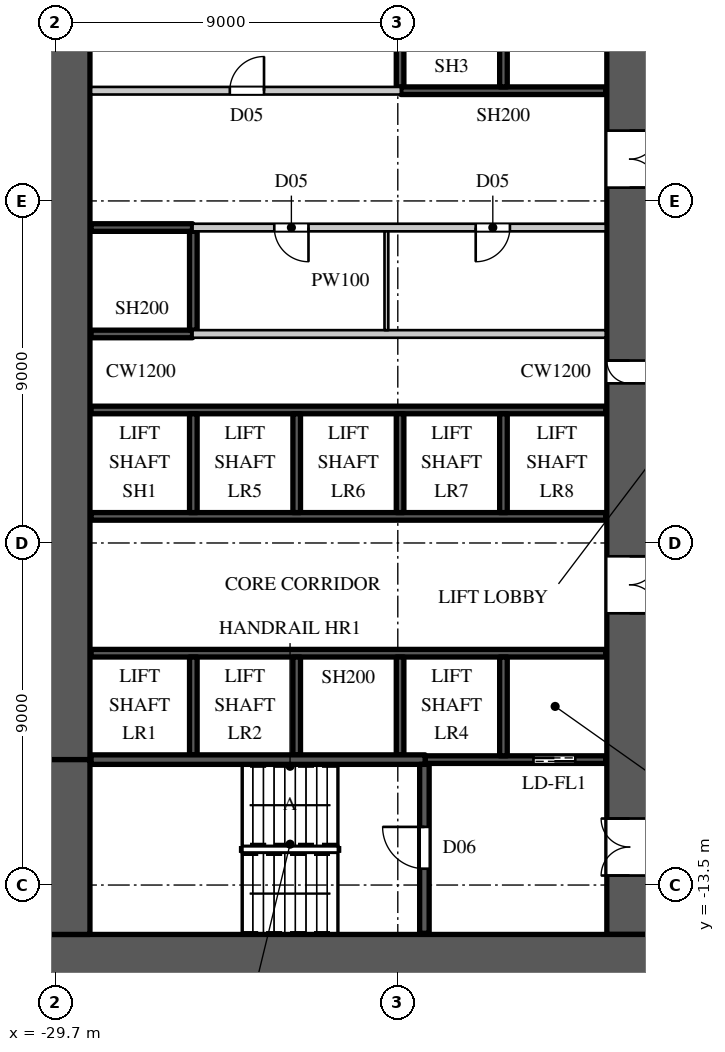
"""IFC4 building model, lengths in metres.
Left out: names, types, materials, properties, quantities, classifications, styles, units other than length and angle.
Written with IfcOpenShell. Run it as: python <this file> out.ifc"""

import sys

from ifc_helpers import new_model, si_unit, direction, frame, frame_2d, origin, place, context, subcontext, project, spatial, rectangle, extrude, element, fill, save


model = new_model("IFC4")
c1 = context("Model", 3, precision=1e-05, world=origin(), true_north=direction((0.0, 1.0)))
c2 = subcontext(c1, "Body", "Model", "MODEL_VIEW")
j1 = project(units=[si_unit("LENGTHUNIT", "METRE"), si_unit("PLANEANGLEUNIT", "RADIAN")], contexts=[c1])
p1 = place(None, origin())
s1 = spatial("IfcSite", under=j1, at=p1, CompositionType="ELEMENT")
p2 = place(p1, origin())
s2 = spatial("IfcBuilding", under=s1, at=p2, CompositionType="ELEMENT")
p3 = place(p2, frame((0.0, 0.0, 29.0)))
s3 = spatial("IfcBuildingStorey", under=s2, at=p3, CompositionType="ELEMENT", Elevation=29.0)
p4 = place(p3, frame((-30.0, -15.4, 0.0), z_axis=(0.0, 0.0, 1.0), x_axis=(1.0, 0.0, 0.0)))
e1 = element("IfcWall", 1, at=p4, inside=s3, PredefinedType="SHEAR", context=c2, shape_type="SweptSolid", body=[
    extrude(rectangle(XDim=16.0, YDim=1.2, at=frame_2d((8.0, 0.0))), origin(), (0.0, 0.0, 1.0), 7.0),
])
p5 = place(p3, frame((-14.6, -14.8, 0.0), z_axis=(0.0, 0.0, 1.0), x_axis=(0.0, 1.0, 0.0)))
e2 = element("IfcWall", 2, at=p5, inside=s3, PredefinedType="SHEAR", context=c2, shape_type="SweptSolid", body=[
    extrude(rectangle(XDim=29.6, YDim=1.2, at=frame_2d((14.8, 0.0))), origin(), (0.0, 0.0, 1.0), 7.0),
])
p6 = place(p5, frame((1.55, 0.0, 0.0)))
e3 = element("IfcOpeningElement", 3, at=p6, cuts=e2, PredefinedType="OPENING", context=c2, shape_type="SweptSolid", body=[
    extrude(rectangle(XDim=1.5, YDim=2.4, at=frame_2d((0.75, 1.2))), frame((0.0, 0.61, 0.0), z_axis=(0.0, -1.0, 0.0), x_axis=(1.0, 0.0, 0.0)), (0.0, 0.0, 1.0), 1.22),
])
p7 = place(p5, frame((26.55, 0.0, 0.0)))
e4 = element("IfcOpeningElement", 4, at=p7, cuts=e2, PredefinedType="OPENING", context=c2, shape_type="SweptSolid", body=[
    extrude(rectangle(XDim=1.5, YDim=2.4, at=frame_2d((0.75, 1.2))), frame((0.0, 0.61, 0.0), z_axis=(0.0, -1.0, 0.0), x_axis=(1.0, 0.0, 0.0)), (0.0, 0.0, 1.0), 1.22),
])
p8 = place(p5, frame((8.45, 0.0, 0.0)))
e5 = element("IfcOpeningElement", 5, at=p8, cuts=e2, PredefinedType="OPENING", context=c2, shape_type="SweptSolid", body=[
    extrude(rectangle(XDim=1.5, YDim=2.4, at=frame_2d((0.75, 1.2))), frame((0.0, 0.61, 0.0), z_axis=(0.0, -1.0, 0.0), x_axis=(1.0, 0.0, 0.0)), (0.0, 0.0, 1.0), 1.22),
])
p9 = place(p5, frame((19.65, 0.0, 0.0)))
e6 = element("IfcOpeningElement", 6, at=p9, cuts=e2, PredefinedType="OPENING", context=c2, shape_type="SweptSolid", body=[
    extrude(rectangle(XDim=1.5, YDim=2.4, at=frame_2d((0.75, 1.2))), frame((0.0, 0.61, 0.0), z_axis=(0.0, -1.0, 0.0), x_axis=(1.0, 0.0, 0.0)), (0.0, 0.0, 1.0), 1.22),
])
p10 = place(p5, frame((14.5, 0.0, 0.0)))
e7 = element("IfcOpeningElement", 7, at=p10, cuts=e2, PredefinedType="OPENING", context=c2, shape_type="SweptSolid", body=[
    extrude(rectangle(XDim=0.6, YDim=2.0, at=frame_2d((0.3, 1.0))), frame((0.0, 0.61, 0.0), z_axis=(0.0, -1.0, 0.0), x_axis=(1.0, 0.0, 0.0)), (0.0, 0.0, 1.0), 1.22),
])
p11 = place(p3, frame((-29.4, -10.2, 0.0), z_axis=(0.0, 0.0, 1.0), x_axis=(0.0, 1.0, 0.0)))
e8 = element("IfcWall", 8, at=p11, inside=s3, PredefinedType="SHEAR", context=c2, shape_type="SweptSolid", body=[
    extrude(rectangle(XDim=20.4, YDim=1.2, at=frame_2d((10.2, 0.0))), origin(), (0.0, 0.0, 1.0), 7.0),
])
p12 = place(p3, frame((-29.4, -14.8, 0.0), z_axis=(0.0, 0.0, 1.0), x_axis=(0.0, 1.0, 0.0)))
e9 = element("IfcWall", 9, at=p12, inside=s3, PredefinedType="SHEAR", context=c2, shape_type="SweptSolid", body=[
    extrude(rectangle(XDim=4.6, YDim=1.2, at=frame_2d((2.3, 0.0))), origin(), (0.0, 0.0, 1.0), 7.0),
])
p13 = place(p3, frame((-28.77, 7.4, 0.0), z_axis=(0.0, 0.0, 1.0), x_axis=(1.0, 0.0, 0.0)))
e10 = element("IfcWall", 10, at=p13, inside=s3, PredefinedType="PARTITIONING", context=c2, shape_type="SweptSolid", body=[
    extrude(rectangle(XDim=8.15, YDim=0.2, at=frame_2d((4.075, 0.0))), origin(), (0.0, 0.0, 1.0), 6.598),
])
p14 = place(p13, frame((3.65, 0.0, 0.0)))
e11 = element("IfcOpeningElement", 11, at=p14, cuts=e10, PredefinedType="OPENING", context=c2, shape_type="SweptSolid", body=[
    extrude(rectangle(XDim=0.9, YDim=2.2, at=frame_2d((0.45, 1.1))), frame((0.0, 0.11, 0.0), z_axis=(0.0, -1.0, 0.0), x_axis=(1.0, 0.0, 0.0)), (0.0, 0.0, 1.0), 0.22),
])
p15 = place(p3, frame((-26.1, 3.8, 0.0), z_axis=(0.0, 0.0, 1.0), x_axis=(1.0, 0.0, 0.0)))
e12 = element("IfcWall", 12, at=p15, inside=s3, PredefinedType="PARTITIONING", context=c2, shape_type="SweptSolid", body=[
    extrude(rectangle(XDim=10.87, YDim=0.2, at=frame_2d((5.435, 0.0))), origin(), (0.0, 0.0, 1.0), 6.598),
])
p16 = place(p15, frame((2.15, 0.0, 0.0)))
e13 = element("IfcOpeningElement", 13, at=p16, cuts=e12, PredefinedType="OPENING", context=c2, shape_type="SweptSolid", body=[
    extrude(rectangle(XDim=0.9, YDim=2.2, at=frame_2d((0.45, 1.1))), frame((0.0, 0.11, 0.0), z_axis=(0.0, -1.0, 0.0), x_axis=(1.0, 0.0, 0.0)), (0.0, 0.0, 1.0), 0.22),
])
p17 = place(p15, frame((7.45, 0.0, 0.0)))
e14 = element("IfcOpeningElement", 14, at=p17, cuts=e12, PredefinedType="OPENING", context=c2, shape_type="SweptSolid", body=[
    extrude(rectangle(XDim=0.9, YDim=2.2, at=frame_2d((0.45, 1.1))), frame((0.0, 0.11, 0.0), z_axis=(0.0, -1.0, 0.0), x_axis=(1.0, 0.0, 0.0)), (0.0, 0.0, 1.0), 0.22),
])
p18 = place(p3, frame((-26.1, 1.0, 0.0), z_axis=(0.0, 0.0, 1.0), x_axis=(1.0, 0.0, 0.0)))
e15 = element("IfcWall", 15, at=p18, inside=s3, PredefinedType="PARTITIONING", context=c2, shape_type="SweptSolid", body=[
    extrude(rectangle(XDim=10.87, YDim=0.2, at=frame_2d((5.435, 0.0))), origin(), (0.0, 0.0, 1.0), 6.598),
])
for number, where, z_axis, x_axis in (
    (16, (-28.77, -7.4, 0.0), (0.0, 0.0, 1.0), (1.0, 0.0, 0.0)),
    (17, (-28.77, -3.8, 0.0), (0.0, 0.0, 1.0), (1.0, 0.0, 0.0)),
    (18, (-28.77, -1.0, 0.0), (0.0, 0.0, 1.0), (1.0, 0.0, 0.0)),
):
    element("IfcWall", number, at=place(p3, frame(where, z_axis=z_axis, x_axis=x_axis)), inside=s3, PredefinedType="SHEAR", context=c2, shape_type="SweptSolid", body=[
        extrude(rectangle(XDim=13.54, YDim=0.2, at=frame_2d((6.77, 0.0))), origin(), (0.0, 0.0, 1.0), 6.598),
    ])
for number, where, z_axis, x_axis in (
    (19, (-28.77, 1.0, 0.0), (0.0, 0.0, 1.0), (1.0, 0.0, 0.0)),
    (20, (-28.77, 3.8, 0.0), (0.0, 0.0, 1.0), (1.0, 0.0, 0.0)),
):
    element("IfcWall", number, at=place(p3, frame(where, z_axis=z_axis, x_axis=x_axis)), inside=s3, PredefinedType="SHEAR", context=c2, shape_type="SweptSolid", body=[
        extrude(rectangle(XDim=2.67, YDim=0.2, at=frame_2d((1.335, 0.0))), origin(), (0.0, 0.0, 1.0), 6.598),
    ])
p19 = place(p3, frame((-26.08, -10.075, 0.0), z_axis=(0.0, 0.0, 1.0), x_axis=(0.0, 1.0, 0.0)))
e21 = element("IfcWall", 21, at=p19, inside=s3, PredefinedType="SHEAR", context=c2, shape_type="SweptSolid", body=[
    extrude(rectangle(XDim=2.575, YDim=0.2, at=frame_2d((1.288, 0.0))), origin(), (0.0, 0.0, 1.0), 7.0),
])
p20 = place(p3, frame((-26.08, -3.7, 0.0), z_axis=(0.0, 0.0, 1.0), x_axis=(0.0, 1.0, 0.0)))
e22 = element("IfcWall", 22, at=p20, inside=s3, PredefinedType="SHEAR", context=c2, shape_type="SweptSolid", body=[
    extrude(rectangle(XDim=2.6, YDim=0.2, at=frame_2d((1.3, 0.0))), origin(), (0.0, 0.0, 1.0), 7.0),
])
p21 = place(p3, frame((-26.08, 1.1, 0.0), z_axis=(0.0, 0.0, 1.0), x_axis=(0.0, 1.0, 0.0)))
e23 = element("IfcWall", 23, at=p21, inside=s3, PredefinedType="SHEAR", context=c2, shape_type="SweptSolid", body=[
    extrude(rectangle(XDim=2.6, YDim=0.2, at=frame_2d((1.3, 0.0))), origin(), (0.0, 0.0, 1.0), 6.598),
])
p22 = place(p3, frame((-23.36, -10.075, 0.0), z_axis=(0.0, 0.0, 1.0), x_axis=(0.0, 1.0, 0.0)))
e24 = element("IfcWall", 24, at=p22, inside=s3, PredefinedType="SHEAR", context=c2, shape_type="SweptSolid", body=[
    extrude(rectangle(XDim=2.575, YDim=0.2, at=frame_2d((1.288, 0.0))), origin(), (0.0, 0.0, 1.0), 7.0),
])
p23 = place(p3, frame((-23.36, -3.7, 0.0), z_axis=(0.0, 0.0, 1.0), x_axis=(0.0, 1.0, 0.0)))
e25 = element("IfcWall", 25, at=p23, inside=s3, PredefinedType="SHEAR", context=c2, shape_type="SweptSolid", body=[
    extrude(rectangle(XDim=2.6, YDim=0.2, at=frame_2d((1.3, 0.0))), origin(), (0.0, 0.0, 1.0), 7.0),
])
p24 = place(p3, frame((-20.64, -10.075, 0.0), z_axis=(0.0, 0.0, 1.0), x_axis=(0.0, 1.0, 0.0)))
e26 = element("IfcWall", 26, at=p24, inside=s3, PredefinedType="SHEAR", context=c2, shape_type="SweptSolid", body=[
    extrude(rectangle(XDim=2.575, YDim=0.2, at=frame_2d((1.288, 0.0))), origin(), (0.0, 0.0, 1.0), 7.0),
])
p25 = place(p3, frame((-20.64, -3.7, 0.0), z_axis=(0.0, 0.0, 1.0), x_axis=(0.0, 1.0, 0.0)))
e27 = element("IfcWall", 27, at=p25, inside=s3, PredefinedType="SHEAR", context=c2, shape_type="SweptSolid", body=[
    extrude(rectangle(XDim=2.6, YDim=0.2, at=frame_2d((1.3, 0.0))), origin(), (0.0, 0.0, 1.0), 7.0),
])
p26 = place(p3, frame((-20.64, 7.5, 0.0), z_axis=(0.0, 0.0, 1.0), x_axis=(0.0, 1.0, 0.0)))
e28 = element("IfcWall", 28, at=p26, inside=s3, PredefinedType="SHEAR", context=c2, shape_type="SweptSolid", body=[
    extrude(rectangle(XDim=2.575, YDim=0.2, at=frame_2d((1.288, 0.0))), origin(), (0.0, 0.0, 1.0), 6.598),
])
p27 = place(p3, frame((-20.62, 7.4, 0.0), z_axis=(0.0, 0.0, 1.0), x_axis=(1.0, 0.0, 0.0)))
e29 = element("IfcWall", 29, at=p27, inside=s3, PredefinedType="SHEAR", context=c2, shape_type="SweptSolid", body=[
    extrude(rectangle(XDim=5.39, YDim=0.2, at=frame_2d((2.695, 0.0))), origin(), (0.0, 0.0, 1.0), 6.598),
])
p28 = place(p3, frame((-19.98, -10.2, 0.0), z_axis=(0.0, 0.0, 1.0), x_axis=(1.0, 0.0, 0.0)))
e30 = element("IfcWall", 30, at=p28, inside=s3, PredefinedType="SHEAR", context=c2, shape_type="SweptSolid", body=[
    extrude(rectangle(XDim=4.75, YDim=0.2, at=frame_2d((2.375, 0.0))), origin(), (0.0, 0.0, 1.0), 6.598),
])
p29 = place(p28, frame((2.85, 0.0, 0.0)))
e31 = element("IfcOpeningElement", 31, at=p29, cuts=e30, PredefinedType="OPENING", context=c2, shape_type="SweptSolid", body=[
    extrude(rectangle(XDim=1.1, YDim=2.2, at=frame_2d((0.55, 1.1))), frame((0.0, 0.11, 0.0), z_axis=(0.0, -1.0, 0.0), x_axis=(1.0, 0.0, 0.0)), (0.0, 0.0, 1.0), 0.22),
])
p30 = place(p3, frame((-17.92, -10.1, 0.0), z_axis=(0.0, 0.0, 1.0), x_axis=(0.0, 1.0, 0.0)))
e32 = element("IfcWall", 32, at=p30, inside=s3, PredefinedType="SHEAR", context=c2, shape_type="SweptSolid", body=[
    extrude(rectangle(XDim=2.6, YDim=0.2, at=frame_2d((1.3, 0.0))), origin(), (0.0, 0.0, 1.0), 7.0),
])
p31 = place(p3, frame((-17.92, -3.7, 0.0), z_axis=(0.0, 0.0, 1.0), x_axis=(0.0, 1.0, 0.0)))
e33 = element("IfcWall", 33, at=p31, inside=s3, PredefinedType="SHEAR", context=c2, shape_type="SweptSolid", body=[
    extrude(rectangle(XDim=2.6, YDim=0.2, at=frame_2d((1.3, 0.0))), origin(), (0.0, 0.0, 1.0), 7.0),
])
p32 = place(p3, frame((-17.92, 7.5, 0.0), z_axis=(0.0, 0.0, 1.0), x_axis=(0.0, 1.0, 0.0)))
e34 = element("IfcWall", 34, at=p32, inside=s3, PredefinedType="SHEAR", context=c2, shape_type="SweptSolid", body=[
    extrude(rectangle(XDim=2.6, YDim=0.2, at=frame_2d((1.3, 0.0))), origin(), (0.0, 0.0, 1.0), 7.0),
])
p33 = place(p3, frame((-28.77, -10.2, 0.0), z_axis=(0.0, 0.0, 1.0), x_axis=(1.0, 0.0, 0.0)))
e35 = element("IfcWall", 35, at=p33, inside=s3, PredefinedType="SHEAR", context=c2, shape_type="SweptSolid", body=[
    extrude(rectangle(XDim=8.79, YDim=0.25, at=frame_2d((4.395, 0.0))), origin(), (0.0, 0.0, 1.0), 6.598),
])
p34 = place(p3, frame((-20.0, -14.77, 0.0), z_axis=(0.0, 0.0, 1.0), x_axis=(0.0, 1.0, 0.0)))
e36 = element("IfcWall", 36, at=p34, inside=s3, PredefinedType="SHEAR", context=c2, shape_type="SweptSolid", body=[
    extrude(rectangle(XDim=4.445, YDim=0.25, at=frame_2d((2.223, 0.0))), origin(), (0.0, 0.0, 1.0), 6.598),
])
p35 = place(p34, frame((1.7, 0.0, 0.0)))
e37 = element("IfcOpeningElement", 37, at=p35, cuts=e36, PredefinedType="OPENING", context=c2, shape_type="SweptSolid", body=[
    extrude(rectangle(XDim=1.1, YDim=2.2, at=frame_2d((0.55, 1.1))), frame((0.0, 0.135, 0.0), z_axis=(0.0, -1.0, 0.0), x_axis=(1.0, 0.0, 0.0)), (0.0, 0.0, 1.0), 0.27),
])
p36 = place(p3, frame((-21.0, 1.1, 0.0), z_axis=(0.0, 0.0, 1.0), x_axis=(0.0, 1.0, 0.0)))
e38 = element("IfcWall", 38, at=p36, inside=s3, PredefinedType="PARTITIONING", context=c2, shape_type="SweptSolid", body=[
    extrude(rectangle(XDim=2.6, YDim=0.1, at=frame_2d((1.3, 0.0))), origin(), (0.0, 0.0, 1.0), 6.598),
])
p37 = place(p35, origin())
e39 = element("IfcDoor", 39, at=p37, inside=s3, OperationType="SINGLE_SWING_RIGHT", PredefinedType="DOOR", context=c2, shape_type="SweptSolid", body=[
    extrude(rectangle(XDim=1.1, YDim=2.2, at=frame_2d((0.55, 1.1))), frame((0.0, 0.025, 0.0), z_axis=(0.0, -1.0, 0.0), x_axis=(1.0, 0.0, 0.0)), (0.0, 0.0, 1.0), 0.05),
])
fill(e37, e39)
p38 = place(p16, origin())
e40 = element("IfcDoor", 40, at=p38, inside=s3, OperationType="SINGLE_SWING_LEFT", PredefinedType="DOOR", context=c2, shape_type="SweptSolid", body=[
    extrude(rectangle(XDim=0.9, YDim=2.2, at=frame_2d((0.45, 1.1))), frame((0.0, 0.025, 0.0), z_axis=(0.0, -1.0, 0.0), x_axis=(1.0, 0.0, 0.0)), (0.0, 0.0, 1.0), 0.05),
])
fill(e13, e40)
p39 = place(p17, origin())
e41 = element("IfcDoor", 41, at=p39, inside=s3, OperationType="SINGLE_SWING_RIGHT", PredefinedType="DOOR", context=c2, shape_type="SweptSolid", body=[
    extrude(rectangle(XDim=0.9, YDim=2.2, at=frame_2d((0.45, 1.1))), frame((0.0, 0.025, 0.0), z_axis=(0.0, -1.0, 0.0), x_axis=(1.0, 0.0, 0.0)), (0.0, 0.0, 1.0), 0.05),
])
fill(e14, e41)
p40 = place(p14, origin())
e42 = element("IfcDoor", 42, at=p40, inside=s3, OperationType="SINGLE_SWING_RIGHT", PredefinedType="DOOR", context=c2, shape_type="SweptSolid", body=[
    extrude(rectangle(XDim=0.9, YDim=2.2, at=frame_2d((0.45, 1.1))), frame((0.0, 0.025, 0.0), z_axis=(0.0, -1.0, 0.0), x_axis=(1.0, 0.0, 0.0)), (0.0, 0.0, 1.0), 0.05),
])
fill(e11, e42)
p41 = place(p29, origin())
e43 = element("IfcDoor", 43, at=p41, inside=s3, OperationType="DOUBLE_DOOR_SLIDING", PredefinedType="DOOR", context=c2, shape_type="SweptSolid", body=[
    extrude(rectangle(XDim=1.1, YDim=2.2, at=frame_2d((0.55, 1.1))), frame((0.0, 0.025, 0.0), z_axis=(0.0, -1.0, 0.0), x_axis=(1.0, 0.0, 0.0)), (0.0, 0.0, 1.0), 0.05),
])
fill(e31, e43)
p42 = place(p6, origin())
e44 = element("IfcDoor", 44, at=p42, inside=s3, OperationType="DOUBLE_DOOR_SINGLE_SWING", PredefinedType="DOOR", context=c2, shape_type="SweptSolid", body=[
    extrude(rectangle(XDim=1.5, YDim=2.4, at=frame_2d((0.75, 1.2))), frame((0.0, 0.025, 0.0), z_axis=(0.0, -1.0, 0.0), x_axis=(1.0, 0.0, 0.0)), (0.0, 0.0, 1.0), 0.05),
])
fill(e3, e44)
p43 = place(p8, origin())
e45 = element("IfcDoor", 45, at=p43, inside=s3, OperationType="DOUBLE_DOOR_SINGLE_SWING", PredefinedType="DOOR", context=c2, shape_type="SweptSolid", body=[
    extrude(rectangle(XDim=1.5, YDim=2.4, at=frame_2d((0.75, 1.2))), frame((0.0, 0.025, 0.0), z_axis=(0.0, -1.0, 0.0), x_axis=(1.0, 0.0, 0.0)), (0.0, 0.0, 1.0), 0.05),
])
fill(e5, e45)
p44 = place(p9, origin())
e46 = element("IfcDoor", 46, at=p44, inside=s3, OperationType="DOUBLE_DOOR_SINGLE_SWING", PredefinedType="DOOR", context=c2, shape_type="SweptSolid", body=[
    extrude(rectangle(XDim=1.5, YDim=2.4, at=frame_2d((0.75, 1.2))), frame((0.0, 0.025, 0.0), z_axis=(0.0, -1.0, 0.0), x_axis=(1.0, 0.0, 0.0)), (0.0, 0.0, 1.0), 0.05),
])
fill(e6, e46)
p45 = place(p10, origin())
e47 = element("IfcDoor", 47, at=p45, inside=s3, OperationType="SINGLE_SWING_RIGHT", PredefinedType="DOOR", context=c2, shape_type="SweptSolid", body=[
    extrude(rectangle(XDim=0.6, YDim=2.0, at=frame_2d((0.3, 1.0))), frame((0.0, 0.025, 0.0), z_axis=(0.0, -1.0, 0.0), x_axis=(1.0, 0.0, 0.0)), (0.0, 0.0, 1.0), 0.05),
])
fill(e7, e47)
save(model, sys.argv[1])
